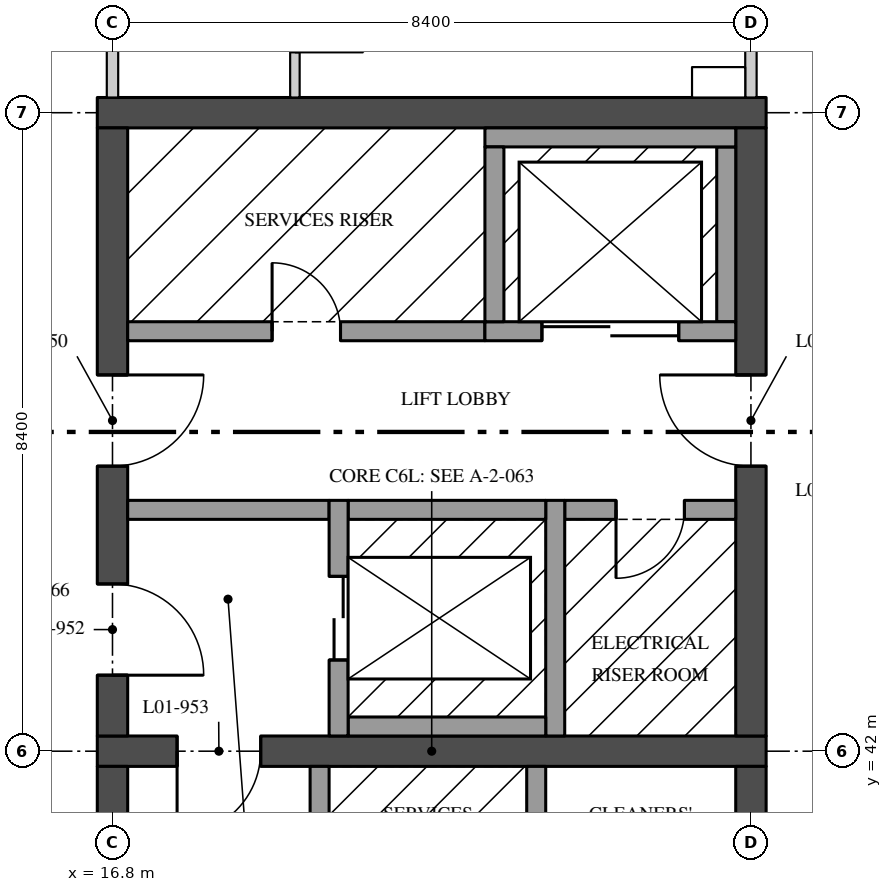
"""IFC4 building model, lengths in metres.
Left out: names, types, materials, properties, quantities, classifications, styles, units other than length and angle.
Written with IfcOpenShell. Run it as: python <this file> out.ifc"""

import sys

from ifc_helpers import new_model, si_unit, direction, frame, frame_2d, origin, place, context, subcontext, project, spatial, rectangle, extrude, element, fill, save


model = new_model("IFC4")
c1 = context("Model", 3, precision=1e-05, world=origin(), true_north=direction((0.0, 1.0)))
c2 = subcontext(c1, "Body", "Model", "MODEL_VIEW")
j1 = project(units=[si_unit("LENGTHUNIT", "METRE"), si_unit("PLANEANGLEUNIT", "RADIAN")], contexts=[c1])
p1 = place(None, origin())
s1 = spatial("IfcSite", under=j1, at=p1, CompositionType="ELEMENT")
p2 = place(p1, origin())
s2 = spatial("IfcBuilding", under=s1, at=p2, CompositionType="ELEMENT")
p3 = place(p2, frame((0.0, 0.0, 5.4)))
s3 = spatial("IfcBuildingStorey", under=s2, at=p3, CompositionType="ELEMENT", Elevation=5.4)
p4 = place(p3, frame((16.6, 42.0, 0.0), z_axis=(0.0, 0.0, 1.0), x_axis=(1.0, 0.0, 0.0)))
e1 = element("IfcWall", 1, at=p4, inside=s3, PredefinedType="SHEAR", context=c2, shape_type="SweptSolid", body=[
    extrude(rectangle(XDim=8.8, YDim=0.4, at=frame_2d((4.4, 0.0))), origin(), (0.0, 0.0, 1.0), 4.37),
])
p5 = place(p4, frame((1.05, 0.0, 0.0)))
e2 = element("IfcOpeningElement", 2, at=p5, cuts=e1, PredefinedType="OPENING", context=c2, shape_type="SweptSolid", body=[
    extrude(rectangle(XDim=1.1, YDim=2.1, at=frame_2d((0.55, 1.05))), frame((0.0, 0.21, 0.0), z_axis=(0.0, -1.0, 0.0), x_axis=(1.0, 0.0, 0.0)), (0.0, 0.0, 1.0), 0.42),
])
p6 = place(p3, frame((16.6, 50.4, 0.0), z_axis=(0.0, 0.0, 1.0), x_axis=(1.0, 0.0, 0.0)))
e3 = element("IfcWall", 3, at=p6, inside=s3, PredefinedType="SHEAR", context=c2, shape_type="SweptSolid", body=[
    extrude(rectangle(XDim=8.8, YDim=0.4, at=frame_2d((4.4, 0.0))), origin(), (0.0, 0.0, 1.0), 4.37),
])
p7 = place(p3, frame((16.8, 42.2, 0.0), z_axis=(0.0, 0.0, 1.0), x_axis=(0.0, 1.0, 0.0)))
e4 = element("IfcWall", 4, at=p7, inside=s3, PredefinedType="SHEAR", context=c2, shape_type="SweptSolid", body=[
    extrude(rectangle(XDim=8.0, YDim=0.4, at=frame_2d((4.0, 0.0))), origin(), (0.0, 0.0, 1.0), 4.37),
])
p8 = place(p7, frame((3.55, 0.0, 0.0)))
e5 = element("IfcOpeningElement", 5, at=p8, cuts=e4, PredefinedType="OPENING", context=c2, shape_type="SweptSolid", body=[
    extrude(rectangle(XDim=1.2, YDim=2.1, at=frame_2d((0.6, 1.05))), frame((0.0, 0.21, 0.0), z_axis=(0.0, -1.0, 0.0), x_axis=(1.0, 0.0, 0.0)), (0.0, 0.0, 1.0), 0.42),
])
p9 = place(p7, frame((0.8, 0.0, 0.0)))
e6 = element("IfcOpeningElement", 6, at=p9, cuts=e4, PredefinedType="OPENING", context=c2, shape_type="SweptSolid", body=[
    extrude(rectangle(XDim=1.2, YDim=2.1, at=frame_2d((0.6, 1.05))), frame((0.0, 0.21, 0.0), z_axis=(0.0, -1.0, 0.0), x_axis=(1.0, 0.0, 0.0)), (0.0, 0.0, 1.0), 0.42),
])
p10 = place(p3, frame((25.2, 42.2, 0.0), z_axis=(0.0, 0.0, 1.0), x_axis=(0.0, 1.0, 0.0)))
e7 = element("IfcWall", 7, at=p10, inside=s3, PredefinedType="SHEAR", context=c2, shape_type="SweptSolid", body=[
    extrude(rectangle(XDim=8.0, YDim=0.4, at=frame_2d((4.0, 0.0))), origin(), (0.0, 0.0, 1.0), 4.37),
])
p11 = place(p10, frame((3.55, 0.0, 0.0)))
e8 = element("IfcOpeningElement", 8, at=p11, cuts=e7, PredefinedType="OPENING", context=c2, shape_type="SweptSolid", body=[
    extrude(rectangle(XDim=1.2, YDim=2.1, at=frame_2d((0.6, 1.05))), frame((0.0, 0.21, 0.0), z_axis=(0.0, -1.0, 0.0), x_axis=(1.0, 0.0, 0.0)), (0.0, 0.0, 1.0), 0.42),
])
p12 = place(p3, frame((21.7, 47.525, 0.0), z_axis=(0.0, 0.0, 1.0), x_axis=(-1.0, 0.0, 0.0)))
e9 = element("IfcWall", 9, at=p12, inside=s3, PredefinedType="SOLIDWALL", context=c2, shape_type="SweptSolid", body=[
    extrude(rectangle(XDim=4.7, YDim=0.25, at=frame_2d((2.35, 0.0))), origin(), (0.0, 0.0, 1.0), 4.37),
])
p13 = place(p12, frame((1.9, 0.0, 0.0)))
e10 = element("IfcOpeningElement", 10, at=p13, cuts=e9, PredefinedType="OPENING", context=c2, shape_type="SweptSolid", body=[
    extrude(rectangle(XDim=0.9, YDim=2.1, at=frame_2d((0.45, 1.05))), frame((0.0, 0.135, 0.0), z_axis=(0.0, -1.0, 0.0), x_axis=(1.0, 0.0, 0.0)), (0.0, 0.0, 1.0), 0.27),
])
p14 = place(p3, frame((25.0, 45.175, 0.0), z_axis=(0.0, 0.0, 1.0), x_axis=(-1.0, 0.0, 0.0)))
e11 = element("IfcWall", 11, at=p14, inside=s3, PredefinedType="SOLIDWALL", context=c2, shape_type="SweptSolid", body=[
    extrude(rectangle(XDim=2.25, YDim=0.25, at=frame_2d((1.125, 0.0))), origin(), (0.0, 0.0, 1.0), 4.37),
])
p15 = place(p14, frame((0.675, 0.0, 0.0)))
e12 = element("IfcOpeningElement", 12, at=p15, cuts=e11, PredefinedType="OPENING", context=c2, shape_type="SweptSolid", body=[
    extrude(rectangle(XDim=0.9, YDim=2.1, at=frame_2d((0.45, 1.05))), frame((0.0, 0.135, 0.0), z_axis=(0.0, -1.0, 0.0), x_axis=(1.0, 0.0, 0.0)), (0.0, 0.0, 1.0), 0.27),
])
p16 = place(p3, frame((19.65, 45.175, 0.0), z_axis=(0.0, 0.0, 1.0), x_axis=(-1.0, 0.0, 0.0)))
e13 = element("IfcWall", 13, at=p16, inside=s3, PredefinedType="SOLIDWALL", context=c2, shape_type="SweptSolid", body=[
    extrude(rectangle(XDim=2.65, YDim=0.25, at=frame_2d((1.325, 0.0))), origin(), (0.0, 0.0, 1.0), 4.37),
])
p17 = place(p3, frame((16.8, 33.8, 0.0), z_axis=(0.0, 0.0, 1.0), x_axis=(0.0, 1.0, 0.0)))
e14 = element("IfcWall", 14, at=p17, inside=s3, PredefinedType="SHEAR", context=c2, shape_type="SweptSolid", body=[
    extrude(rectangle(XDim=8.0, YDim=0.4, at=frame_2d((4.0, 0.0))), origin(), (0.0, 0.0, 1.0), 4.37),
])
p18 = place(p17, frame((3.875, 0.0, 0.0)))
e15 = element("IfcOpeningElement", 15, at=p18, cuts=e14, PredefinedType="OPENING", context=c2, shape_type="SweptSolid", body=[
    extrude(rectangle(XDim=1.2, YDim=2.1, at=frame_2d((0.6, 1.05))), frame((0.0, 0.21, 0.0), z_axis=(0.0, -1.0, 0.0), x_axis=(1.0, 0.0, 0.0)), (0.0, 0.0, 1.0), 0.42),
])
p19 = place(p3, frame((25.2, 33.8, 0.0), z_axis=(0.0, 0.0, 1.0), x_axis=(0.0, 1.0, 0.0)))
e16 = element("IfcWall", 16, at=p19, inside=s3, PredefinedType="SHEAR", context=c2, shape_type="SweptSolid", body=[
    extrude(rectangle(XDim=8.0, YDim=0.4, at=frame_2d((4.0, 0.0))), origin(), (0.0, 0.0, 1.0), 4.37),
])
p20 = place(p19, frame((3.875, 0.0, 0.0)))
e17 = element("IfcOpeningElement", 17, at=p20, cuts=e16, PredefinedType="OPENING", context=c2, shape_type="SweptSolid", body=[
    extrude(rectangle(XDim=1.2, YDim=2.1, at=frame_2d((0.6, 1.05))), frame((0.0, 0.21, 0.0), z_axis=(0.0, -1.0, 0.0), x_axis=(1.0, 0.0, 0.0)), (0.0, 0.0, 1.0), 0.42),
])
p21 = place(p3, frame((19.525, 39.0, 0.0), z_axis=(0.0, 0.0, 1.0), x_axis=(0.0, 1.0, 0.0)))
e18 = element("IfcWall", 18, at=p21, inside=s3, PredefinedType="SOLIDWALL", context=c2, shape_type="SweptSolid", body=[
    extrude(rectangle(XDim=2.8, YDim=0.25, at=frame_2d((1.4, 0.0))), origin(), (0.0, 0.0, 1.0), 4.37),
])
p22 = place(p3, frame((22.375, 39.25, 0.0), z_axis=(0.0, 0.0, 1.0), x_axis=(0.0, 1.0, 0.0)))
e19 = element("IfcWall", 19, at=p22, inside=s3, PredefinedType="SOLIDWALL", context=c2, shape_type="SweptSolid", body=[
    extrude(rectangle(XDim=2.55, YDim=0.25, at=frame_2d((1.275, 0.0))), origin(), (0.0, 0.0, 1.0), 4.37),
])
p23 = place(p3, frame((24.875, 47.65, 0.0), z_axis=(0.0, 0.0, 1.0), x_axis=(0.0, 1.0, 0.0)))
e20 = element("IfcWall", 20, at=p23, inside=s3, PredefinedType="SOLIDWALL", context=c2, shape_type="SweptSolid", body=[
    extrude(rectangle(XDim=2.3, YDim=0.25, at=frame_2d((1.15, 0.0))), origin(), (0.0, 0.0, 1.0), 4.37),
])
p24 = place(p3, frame((21.7, 50.075, 0.0), z_axis=(0.0, 0.0, 1.0), x_axis=(1.0, 0.0, 0.0)))
e21 = element("IfcWall", 21, at=p24, inside=s3, PredefinedType="SOLIDWALL", context=c2, shape_type="SweptSolid", body=[
    extrude(rectangle(XDim=3.3, YDim=0.25, at=frame_2d((1.65, 0.0))), origin(), (0.0, 0.0, 1.0), 4.37),
])
p25 = place(p3, frame((21.7, 47.525, 0.0), z_axis=(0.0, 0.0, 1.0), x_axis=(1.0, 0.0, 0.0)))
e22 = element("IfcWall", 22, at=p25, inside=s3, PredefinedType="SOLIDWALL", context=c2, shape_type="SweptSolid", body=[
    extrude(rectangle(XDim=3.3, YDim=0.25, at=frame_2d((1.65, 0.0))), origin(), (0.0, 0.0, 1.0), 4.37),
])
p26 = place(p25, frame((0.75, 0.0, 0.0)))
e23 = element("IfcOpeningElement", 23, at=p26, cuts=e22, PredefinedType="OPENING", context=c2, shape_type="SweptSolid", body=[
    extrude(rectangle(XDim=1.8, YDim=2.1, at=frame_2d((0.9, 1.05))), frame((0.0, 0.135, 0.0), z_axis=(0.0, -1.0, 0.0), x_axis=(1.0, 0.0, 0.0)), (0.0, 0.0, 1.0), 0.27),
])
p27 = place(p3, frame((21.825, 47.65, 0.0), z_axis=(0.0, 0.0, 1.0), x_axis=(0.0, 1.0, 0.0)))
e24 = element("IfcWall", 24, at=p27, inside=s3, PredefinedType="SOLIDWALL", context=c2, shape_type="SweptSolid", body=[
    extrude(rectangle(XDim=2.3, YDim=0.25, at=frame_2d((1.15, 0.0))), origin(), (0.0, 0.0, 1.0), 4.37),
])
p28 = place(p3, frame((22.625, 42.2, 0.0), z_axis=(0.0, 0.0, 1.0), x_axis=(0.0, 1.0, 0.0)))
e25 = element("IfcWall", 25, at=p28, inside=s3, PredefinedType="SOLIDWALL", context=c2, shape_type="SweptSolid", body=[
    extrude(rectangle(XDim=3.1, YDim=0.25, at=frame_2d((1.55, 0.0))), origin(), (0.0, 0.0, 1.0), 4.37),
])
for number, where, z_axis, x_axis in (
    (26, (19.9, 45.175, 0.0), (0.0, 0.0, 1.0), (1.0, 0.0, 0.0)),
    (27, (19.9, 42.325, 0.0), (0.0, 0.0, 1.0), (1.0, 0.0, 0.0)),
):
    element("IfcWall", number, at=place(p3, frame(where, z_axis=z_axis, x_axis=x_axis)), inside=s3, PredefinedType="SOLIDWALL", context=c2, shape_type="SweptSolid", body=[
        extrude(rectangle(XDim=2.6, YDim=0.25, at=frame_2d((1.3, 0.0))), origin(), (0.0, 0.0, 1.0), 4.37),
    ])
p29 = place(p3, frame((19.775, 42.2, 0.0), z_axis=(0.0, 0.0, 1.0), x_axis=(0.0, 1.0, 0.0)))
e28 = element("IfcWall", 28, at=p29, inside=s3, PredefinedType="SOLIDWALL", context=c2, shape_type="SweptSolid", body=[
    extrude(rectangle(XDim=3.1, YDim=0.25, at=frame_2d((1.55, 0.0))), origin(), (0.0, 0.0, 1.0), 4.37),
])
p30 = place(p29, frame((1.0, 0.0, 0.0)))
e29 = element("IfcOpeningElement", 29, at=p30, cuts=e28, PredefinedType="OPENING", context=c2, shape_type="SweptSolid", body=[
    extrude(rectangle(XDim=1.1, YDim=2.1, at=frame_2d((0.55, 1.05))), frame((0.0, 0.135, 0.0), z_axis=(0.0, -1.0, 0.0), x_axis=(1.0, 0.0, 0.0)), (0.0, 0.0, 1.0), 0.27),
])
p31 = place(p3, frame((25.2, 50.6, 0.0), z_axis=(0.0, 0.0, 1.0), x_axis=(0.0, 1.0, 0.0)))
e30 = element("IfcWall", 30, at=p31, inside=s3, PredefinedType="PARTITIONING", context=c2, shape_type="SweptSolid", body=[
    extrude(rectangle(XDim=2.8, YDim=0.15, at=frame_2d((1.4, 0.0))), origin(), (0.0, 0.0, 1.0), 3.746),
])
p32 = place(p3, frame((16.8, 50.6, 0.0), z_axis=(0.0, 0.0, 1.0), x_axis=(0.0, 1.0, 0.0)))
e31 = element("IfcWall", 31, at=p32, inside=s3, PredefinedType="PARTITIONING", context=c2, shape_type="SweptSolid", body=[
    extrude(rectangle(XDim=8.0, YDim=0.15, at=frame_2d((4.0, 0.0))), origin(), (0.0, 0.0, 1.0), 3.746),
])
p33 = place(p32, frame((2.35, 0.0, 0.0)))
e32 = element("IfcOpeningElement", 32, at=p33, cuts=e31, PredefinedType="OPENING", context=c2, shape_type="SweptSolid", body=[
    extrude(rectangle(XDim=0.9, YDim=2.1, at=frame_2d((0.45, 1.05))), frame((0.0, 0.085, 0.0), z_axis=(0.0, -1.0, 0.0), x_axis=(1.0, 0.0, 0.0)), (0.0, 0.0, 1.0), 0.17),
])
p34 = place(p3, frame((19.2, 50.6, 0.0), z_axis=(0.0, 0.0, 1.0), x_axis=(0.0, 1.0, 0.0)))
e33 = element("IfcWall", 33, at=p34, inside=s3, PredefinedType="PARTITIONING", context=c2, shape_type="SweptSolid", body=[
    extrude(rectangle(XDim=2.8, YDim=0.125, at=frame_2d((1.4, 0.0))), origin(), (0.0, 0.0, 1.0), 4.37),
])
p35 = place(p34, frame((0.6, 0.0, 0.0)))
e34 = element("IfcOpeningElement", 34, at=p35, cuts=e33, PredefinedType="OPENING", context=c2, shape_type="SweptSolid", body=[
    extrude(rectangle(XDim=0.9, YDim=2.1, at=frame_2d((0.45, 1.05))), frame((0.0, 0.073, 0.0), z_axis=(0.0, -1.0, 0.0), x_axis=(1.0, 0.0, 0.0)), (0.0, 0.0, 1.0), 0.145),
])
p36 = place(p8, frame((1.2, 0.0, 0.0), z_axis=(0.0, 0.0, 1.0), x_axis=(-1.0, 0.0, 0.0)))
e35 = element("IfcDoor", 35, at=p36, inside=s3, OperationType="SINGLE_SWING_RIGHT", PredefinedType="DOOR", context=c2, shape_type="SweptSolid", body=[
    extrude(rectangle(XDim=1.2, YDim=2.1, at=frame_2d((0.6, 1.05))), frame((0.0, 0.035, 0.0), z_axis=(0.0, -1.0, 0.0), x_axis=(1.0, 0.0, 0.0)), (0.0, 0.0, 1.0), 0.07),
])
fill(e5, e35)
p37 = place(p11, origin())
e36 = element("IfcDoor", 36, at=p37, inside=s3, OperationType="SINGLE_SWING_LEFT", PredefinedType="DOOR", context=c2, shape_type="SweptSolid", body=[
    extrude(rectangle(XDim=1.2, YDim=2.1, at=frame_2d((0.6, 1.05))), frame((0.0, 0.035, 0.0), z_axis=(0.0, -1.0, 0.0), x_axis=(1.0, 0.0, 0.0)), (0.0, 0.0, 1.0), 0.07),
])
fill(e8, e36)
p38 = place(p9, frame((1.2, 0.0, 0.0), z_axis=(0.0, 0.0, 1.0), x_axis=(-1.0, 0.0, 0.0)))
e37 = element("IfcDoor", 37, at=p38, inside=s3, OperationType="SINGLE_SWING_LEFT", PredefinedType="DOOR", context=c2, shape_type="SweptSolid", body=[
    extrude(rectangle(XDim=1.2, YDim=2.1, at=frame_2d((0.6, 1.05))), frame((0.0, 0.035, 0.0), z_axis=(0.0, -1.0, 0.0), x_axis=(1.0, 0.0, 0.0)), (0.0, 0.0, 1.0), 0.07),
])
fill(e6, e37)
p39 = place(p5, frame((1.1, 0.0, 0.0), z_axis=(0.0, 0.0, 1.0), x_axis=(-1.0, 0.0, 0.0)))
e38 = element("IfcDoor", 38, at=p39, inside=s3, OperationType="SINGLE_SWING_LEFT", PredefinedType="DOOR", context=c2, shape_type="SweptSolid", body=[
    extrude(rectangle(XDim=1.1, YDim=2.1, at=frame_2d((0.55, 1.05))), frame((0.0, 0.035, 0.0), z_axis=(0.0, -1.0, 0.0), x_axis=(1.0, 0.0, 0.0)), (0.0, 0.0, 1.0), 0.07),
])
fill(e2, e38)
p40 = place(p13, frame((0.9, 0.0, 0.0), z_axis=(0.0, 0.0, 1.0), x_axis=(-1.0, 0.0, 0.0)))
e39 = element("IfcDoor", 39, at=p40, inside=s3, OperationType="SINGLE_SWING_RIGHT", PredefinedType="DOOR", context=c2, shape_type="SweptSolid", body=[
    extrude(rectangle(XDim=0.9, YDim=2.1, at=frame_2d((0.45, 1.05))), frame((0.0, 0.035, 0.0), z_axis=(0.0, -1.0, 0.0), x_axis=(1.0, 0.0, 0.0)), (0.0, 0.0, 1.0), 0.07),
])
fill(e10, e39)
p41 = place(p15, origin())
e40 = element("IfcDoor", 40, at=p41, inside=s3, OperationType="SINGLE_SWING_LEFT", PredefinedType="DOOR", context=c2, shape_type="SweptSolid", body=[
    extrude(rectangle(XDim=0.9, YDim=2.1, at=frame_2d((0.45, 1.05))), frame((0.0, 0.05, 0.0), z_axis=(0.0, -1.0, 0.0), x_axis=(1.0, 0.0, 0.0)), (0.0, 0.0, 1.0), 0.1),
])
fill(e12, e40)
p42 = place(p26, origin())
e41 = element("IfcDoor", 41, at=p42, inside=s3, OperationType="DOUBLE_DOOR_SLIDING", PredefinedType="DOOR", context=c2, shape_type="SweptSolid", body=[
    extrude(rectangle(XDim=1.8, YDim=2.1, at=frame_2d((0.9, 1.05))), frame((0.0, 0.04, 0.0), z_axis=(0.0, -1.0, 0.0), x_axis=(1.0, 0.0, 0.0)), (0.0, 0.0, 1.0), 0.08),
])
fill(e23, e41)
p43 = place(p30, origin())
e42 = element("IfcDoor", 42, at=p43, inside=s3, OperationType="DOUBLE_DOOR_SLIDING", PredefinedType="DOOR", context=c2, shape_type="SweptSolid", body=[
    extrude(rectangle(XDim=1.1, YDim=2.1, at=frame_2d((0.55, 1.05))), frame((0.0, 0.04, 0.0), z_axis=(0.0, -1.0, 0.0), x_axis=(1.0, 0.0, 0.0)), (0.0, 0.0, 1.0), 0.08),
])
fill(e29, e42)
save(model, sys.argv[1])
